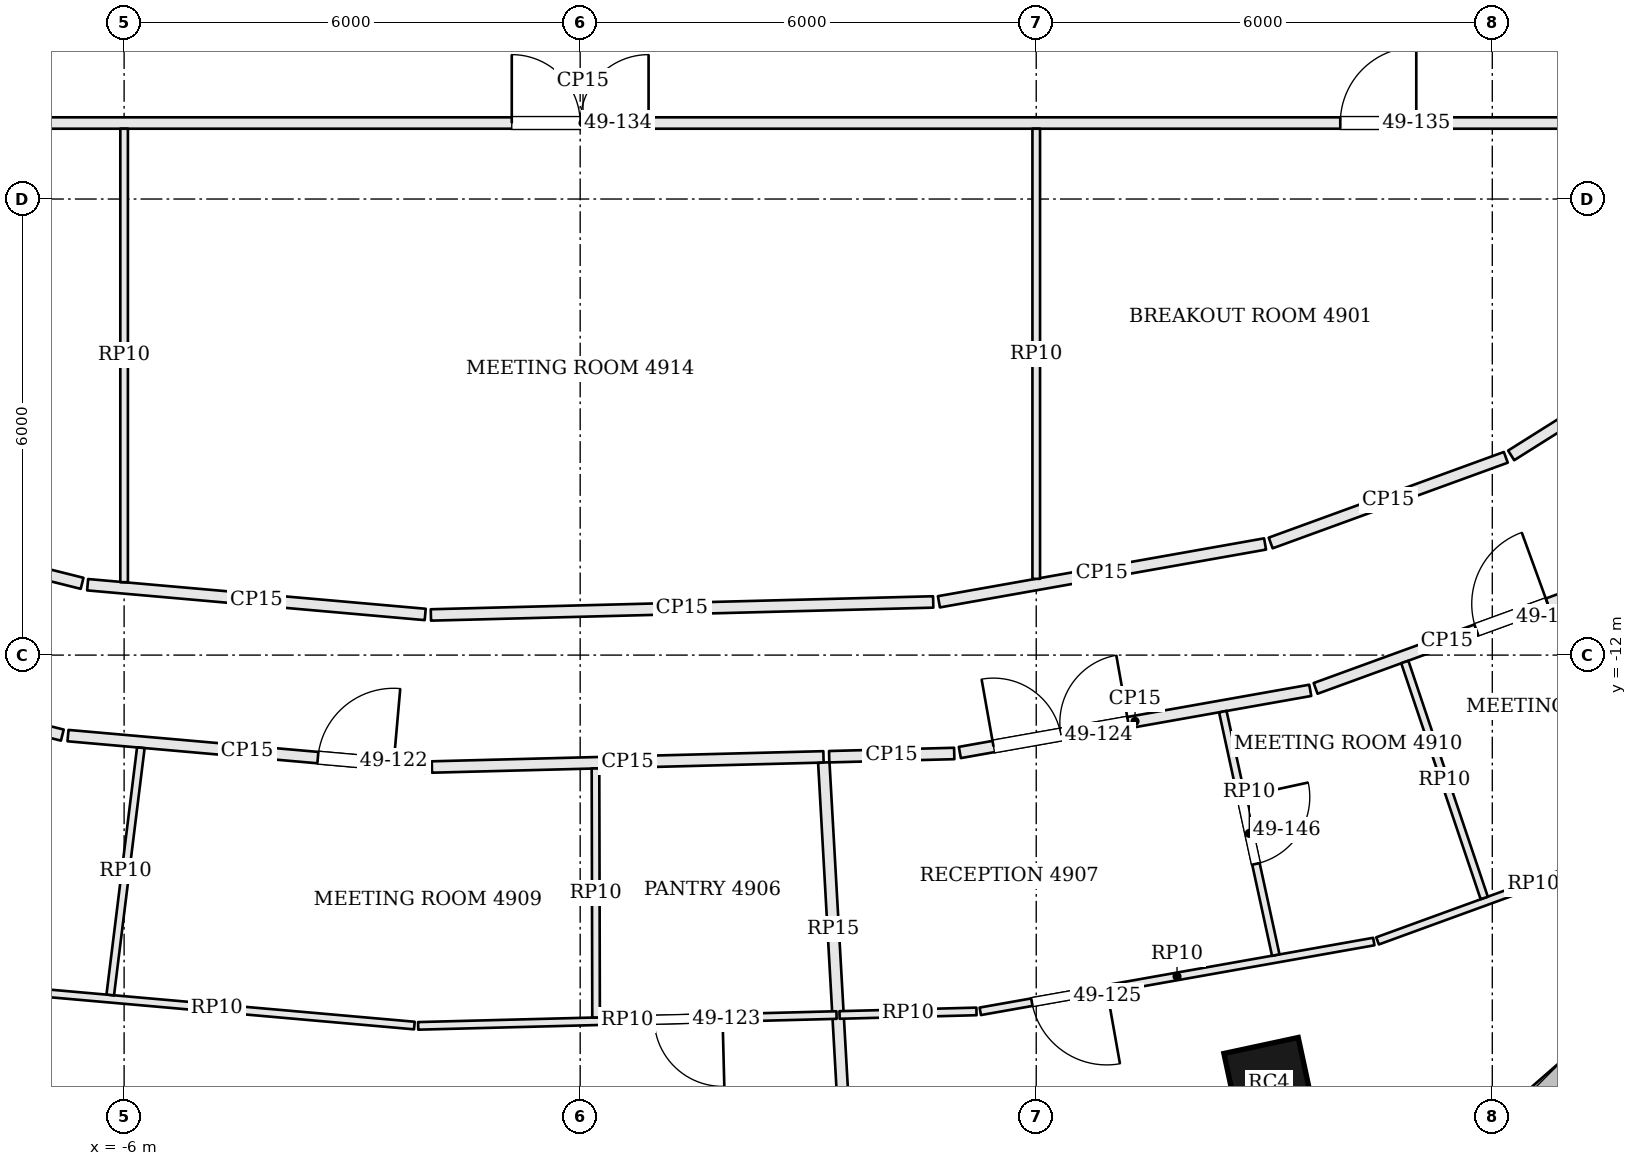
"""IFC4 building model, lengths in metres.
Left out: names, types, materials, properties, quantities, classifications, styles, units other than length and angle.
Written with IfcOpenShell. Run it as: python <this file> out.ifc"""

import sys

from ifc_helpers import new_model, si_unit, direction, frame, frame_2d, origin, origin_2d, place, context, subcontext, project, spatial, rectangle, extrude, element, fill, save


model = new_model("IFC4")
c1 = context("Model", 3, precision=1e-05, world=origin(), true_north=direction((0.0, 1.0)))
c2 = subcontext(c1, "Body", "Model", "MODEL_VIEW")
j1 = project(units=[si_unit("LENGTHUNIT", "METRE"), si_unit("PLANEANGLEUNIT", "RADIAN")], contexts=[c1])
p1 = place(None, origin())
s1 = spatial("IfcSite", under=j1, at=p1, CompositionType="ELEMENT")
p2 = place(p1, origin())
s2 = spatial("IfcBuilding", under=s1, at=p2, CompositionType="ELEMENT")
p3 = place(p2, frame((0.0, 0.0, 201.3)))
s3 = spatial("IfcBuildingStorey", under=s2, at=p3, CompositionType="ELEMENT", Elevation=201.3)
p4 = place(p3, frame((9.063, -17.625, 0.0), z_axis=(0.0, 0.0, 1.0), x_axis=(0.977652674797, 0.210226657352, 0.0)))
e1 = element("IfcColumn", 1, at=p4, inside=s3, PredefinedType="COLUMN", context=c2, shape_type="SweptSolid", body=[
    extrude(rectangle(XDim=1.0, YDim=1.0, at=origin_2d()), origin(), (0.0, 0.0, 1.0), 3.9),
])
p5 = place(p3, frame((10.146, -20.051, 0.0), z_axis=(0.0, 0.0, 1.0), x_axis=(0.753278140428, 0.657702093013, 0.0)))
e2 = element("IfcWall", 2, at=p5, inside=s3, PredefinedType="SOLIDWALL", context=c2, shape_type="SweptSolid", body=[
    extrude(rectangle(XDim=4.008, YDim=0.45, at=frame_2d((2.004, 0.0))), origin(), (0.0, 0.0, 1.0), 3.7),
])
p6 = place(p5, frame((0.954, 0.0, 0.9)))
e3 = element("IfcOpeningElement", 3, at=p6, cuts=e2, PredefinedType="OPENING", context=c2, shape_type="SweptSolid", body=[
    extrude(rectangle(XDim=2.1, YDim=2.3, at=frame_2d((1.05, 1.15))), frame((0.0, 0.235, 0.0), z_axis=(0.0, -1.0, 0.0), x_axis=(1.0, 0.0, 0.0)), (0.0, 0.0, 1.0), 0.47),
])
p7 = place(p3, frame((-11.392, -11.905, 0.0), z_axis=(0.0, 0.0, 1.0), x_axis=(0.970002383823, -0.243095403859, 0.0)))
e4 = element("IfcWall", 4, at=p7, inside=s3, PredefinedType="PARTITIONING", context=c2, shape_type="SweptSolid", body=[
    extrude(rectangle(XDim=4.72, YDim=0.15, at=frame_2d((2.36, 0.0))), origin(), (0.0, 0.0, 1.0), 3.084),
])
p8 = place(p7, frame((1.812, 0.0, 0.0)))
e5 = element("IfcOpeningElement", 5, at=p8, cuts=e4, PredefinedType="OPENING", context=c2, shape_type="SweptSolid", body=[
    extrude(rectangle(XDim=1.8, YDim=2.1, at=frame_2d((0.9, 1.05))), frame((0.0, 0.085, 0.0), z_axis=(0.0, -1.0, 0.0), x_axis=(1.0, 0.0, 0.0)), (0.0, 0.0, 1.0), 0.17),
])
p9 = place(p3, frame((-6.738, -13.059, 0.0), z_axis=(0.0, 0.0, 1.0), x_axis=(0.996143527037, -0.087738666181, 0.0)))
e6 = element("IfcWall", 6, at=p9, inside=s3, PredefinedType="PARTITIONING", context=c2, shape_type="SweptSolid", body=[
    extrude(rectangle(XDim=4.73, YDim=0.15, at=frame_2d((2.365, 0.0))), origin(), (0.0, 0.0, 1.0), 3.084),
])
p10 = place(p9, frame((3.3, 0.0, 0.0)))
e7 = element("IfcOpeningElement", 7, at=p10, cuts=e6, PredefinedType="OPENING", context=c2, shape_type="SweptSolid", body=[
    extrude(rectangle(XDim=1.0, YDim=2.4, at=frame_2d((0.5, 1.2))), frame((0.0, 0.085, 0.0), z_axis=(0.0, -1.0, 0.0), x_axis=(1.0, 0.0, 0.0)), (0.0, 0.0, 1.0), 0.17),
])
p11 = place(p3, frame((-1.951, -13.472, 0.0), z_axis=(0.0, 0.0, 1.0), x_axis=(0.999664233407, 0.025911782006, 0.0)))
e8 = element("IfcWall", 8, at=p11, inside=s3, PredefinedType="PARTITIONING", context=c2, shape_type="SweptSolid", body=[
    extrude(rectangle(XDim=5.154, YDim=0.15, at=frame_2d((2.577, 0.0))), origin(), (0.0, 0.0, 1.0), 3.084),
])
p12 = place(p3, frame((3.452, -17.796, 0.0), z_axis=(0.0, 0.0, 1.0), x_axis=(-0.056341757652, 0.998411541572, 0.0)))
e9 = element("IfcWall", 9, at=p12, inside=s3, PredefinedType="PARTITIONING", context=c2, shape_type="SweptSolid", body=[
    extrude(rectangle(XDim=4.39, YDim=0.15, at=frame_2d((2.195, 0.0))), origin(), (0.0, 0.0, 1.0), 3.084),
])
p13 = place(p3, frame((3.276, -13.337, 0.0), z_axis=(0.0, 0.0, 1.0), x_axis=(0.999662995572, 0.025959493133, 0.0)))
e10 = element("IfcWall", 10, at=p13, inside=s3, PredefinedType="PARTITIONING", context=c2, shape_type="SweptSolid", body=[
    extrude(rectangle(XDim=1.646, YDim=0.15, at=frame_2d((0.823, 0.0))), origin(), (0.0, 0.0, 1.0), 3.084),
])
p14 = place(p3, frame((4.995, -13.281, 0.0), z_axis=(0.0, 0.0, 1.0), x_axis=(0.98463411377, 0.174630071865, 0.0)))
e11 = element("IfcWall", 11, at=p14, inside=s3, PredefinedType="PARTITIONING", context=c2, shape_type="SweptSolid", body=[
    extrude(rectangle(XDim=4.682, YDim=0.15, at=frame_2d((2.341, 0.0))), origin(), (0.0, 0.0, 1.0), 3.084),
])
p15 = place(p14, frame((0.45, 0.0, 0.0)))
e12 = element("IfcOpeningElement", 12, at=p15, cuts=e11, PredefinedType="OPENING", context=c2, shape_type="SweptSolid", body=[
    extrude(rectangle(XDim=1.8, YDim=2.1, at=frame_2d((0.9, 1.05))), frame((0.0, 0.085, 0.0), z_axis=(0.0, -1.0, 0.0), x_axis=(1.0, 0.0, 0.0)), (0.0, 0.0, 1.0), 0.17),
])
p16 = place(p3, frame((9.676, -12.438, 0.0), z_axis=(0.0, 0.0, 1.0), x_axis=(0.939640289748, 0.342163887461, 0.0)))
e13 = element("IfcWall", 13, at=p16, inside=s3, PredefinedType="PARTITIONING", context=c2, shape_type="SweptSolid", body=[
    extrude(rectangle(XDim=3.68, YDim=0.15, at=frame_2d((1.84, 0.0))), origin(), (0.0, 0.0, 1.0), 3.084),
])
p17 = place(p16, frame((2.25, 0.0, 0.0)))
e14 = element("IfcOpeningElement", 14, at=p17, cuts=e13, PredefinedType="OPENING", context=c2, shape_type="SweptSolid", body=[
    extrude(rectangle(XDim=1.0, YDim=2.4, at=frame_2d((0.5, 1.2))), frame((0.0, 0.085, 0.0), z_axis=(0.0, -1.0, 0.0), x_axis=(1.0, 0.0, 0.0)), (0.0, 0.0, 1.0), 0.17),
])
p18 = place(p3, frame((14.777, -7.781, 0.0), z_axis=(0.0, 0.0, 1.0), x_axis=(-0.846359741043, -0.532611667862, 0.0)))
e15 = element("IfcWall", 15, at=p18, inside=s3, PredefinedType="PARTITIONING", context=c2, shape_type="SweptSolid", body=[
    extrude(rectangle(XDim=2.987, YDim=0.15, at=frame_2d((1.494, 0.0))), origin(), (0.0, 0.0, 1.0), 3.084),
])
p19 = place(p3, frame((12.178, -9.398, 0.0), z_axis=(0.0, 0.0, 1.0), x_axis=(-0.939609240084, -0.342249143093, 0.0)))
e16 = element("IfcWall", 16, at=p19, inside=s3, PredefinedType="PARTITIONING", context=c2, shape_type="SweptSolid", body=[
    extrude(rectangle(XDim=3.292, YDim=0.15, at=frame_2d((1.646, 0.0))), origin(), (0.0, 0.0, 1.0), 3.084),
])
p20 = place(p3, frame((9.01, -10.538, 0.0), z_axis=(0.0, 0.0, 1.0), x_axis=(-0.984645638575, -0.174565077936, 0.0)))
e17 = element("IfcWall", 17, at=p20, inside=s3, PredefinedType="PARTITIONING", context=c2, shape_type="SweptSolid", body=[
    extrude(rectangle(XDim=4.358, YDim=0.15, at=frame_2d((2.179, 0.0))), origin(), (0.0, 0.0, 1.0), 3.084),
])
p21 = place(p3, frame((4.645, -11.301, 0.0), z_axis=(0.0, 0.0, 1.0), x_axis=(-0.9996648469, -0.02588810291, 0.0)))
e18 = element("IfcWall", 18, at=p21, inside=s3, PredefinedType="PARTITIONING", context=c2, shape_type="SweptSolid", body=[
    extrude(rectangle(XDim=6.611, YDim=0.15, at=frame_2d((3.305, 0.0))), origin(), (0.0, 0.0, 1.0), 3.084),
])
p22 = place(p3, frame((-2.039, -11.465, 0.0), z_axis=(0.0, 0.0, 1.0), x_axis=(-0.996139855484, 0.087780341286, 0.0)))
e19 = element("IfcWall", 19, at=p22, inside=s3, PredefinedType="PARTITIONING", context=c2, shape_type="SweptSolid", body=[
    extrude(rectangle(XDim=4.458, YDim=0.15, at=frame_2d((2.229, 0.0))), origin(), (0.0, 0.0, 1.0), 3.084),
])
p23 = place(p3, frame((-6.553, -11.056, 0.0), z_axis=(0.0, 0.0, 1.0), x_axis=(-0.970004917182, 0.243085294995, 0.0)))
e20 = element("IfcWall", 20, at=p23, inside=s3, PredefinedType="PARTITIONING", context=c2, shape_type="SweptSolid", body=[
    extrude(rectangle(XDim=4.284, YDim=0.15, at=frame_2d((2.142, 0.0))), origin(), (0.0, 0.0, 1.0), 3.084),
])
p24 = place(p3, frame((-14.925, -5.0, 0.0), z_axis=(0.0, 0.0, 1.0), x_axis=(1.0, 0.0, 0.0)))
e21 = element("IfcWall", 21, at=p24, inside=s3, PredefinedType="PARTITIONING", context=c2, shape_type="SweptSolid", body=[
    extrude(rectangle(XDim=29.925, YDim=0.15, at=frame_2d((14.962, 0.0))), origin(), (0.0, 0.0, 1.0), 3.084),
])
p25 = place(p24, frame((3.925, 0.0, 0.0)))
e22 = element("IfcOpeningElement", 22, at=p25, cuts=e21, PredefinedType="OPENING", context=c2, shape_type="SweptSolid", body=[
    extrude(rectangle(XDim=1.0, YDim=2.1, at=frame_2d((0.5, 1.05))), frame((0.0, 0.085, 0.0), z_axis=(0.0, -1.0, 0.0), x_axis=(1.0, 0.0, 0.0)), (0.0, 0.0, 1.0), 0.17),
])
p26 = place(p24, frame((14.025, 0.0, 0.0)))
e23 = element("IfcOpeningElement", 23, at=p26, cuts=e21, PredefinedType="OPENING", context=c2, shape_type="SweptSolid", body=[
    extrude(rectangle(XDim=1.8, YDim=2.1, at=frame_2d((0.9, 1.05))), frame((0.0, 0.085, 0.0), z_axis=(0.0, -1.0, 0.0), x_axis=(1.0, 0.0, 0.0)), (0.0, 0.0, 1.0), 0.17),
])
p27 = place(p24, frame((24.925, 0.0, 0.0)))
e24 = element("IfcOpeningElement", 24, at=p27, cuts=e21, PredefinedType="OPENING", context=c2, shape_type="SweptSolid", body=[
    extrude(rectangle(XDim=1.0, YDim=2.1, at=frame_2d((0.5, 1.05))), frame((0.0, 0.085, 0.0), z_axis=(0.0, -1.0, 0.0), x_axis=(1.0, 0.0, 0.0)), (0.0, 0.0, 1.0), 0.17),
])
p28 = place(p3, frame((3.373, -16.736, 0.0), z_axis=(0.0, 0.0, 1.0), x_axis=(-0.99966581351, -0.025850750467, 0.0)))
e25 = element("IfcWall", 25, at=p28, inside=s3, PredefinedType="PARTITIONING", context=c2, shape_type="SweptSolid", body=[
    extrude(rectangle(XDim=5.506, YDim=0.1, at=frame_2d((2.753, 0.0))), origin(), (0.0, 0.0, 1.0), 3.084),
])
p29 = place(p28, frame((1.5, 0.0, 0.0)))
e26 = element("IfcOpeningElement", 26, at=p29, cuts=e25, PredefinedType="OPENING", context=c2, shape_type="SweptSolid", body=[
    extrude(rectangle(XDim=0.9, YDim=2.1, at=frame_2d((0.45, 1.05))), frame((0.0, 0.06, 0.0), z_axis=(0.0, -1.0, 0.0), x_axis=(1.0, 0.0, 0.0)), (0.0, 0.0, 1.0), 0.12),
])
p30 = place(p3, frame((-2.181, -16.874, 0.0), z_axis=(0.0, 0.0, 1.0), x_axis=(-0.996143934904, 0.087734035321, 0.0)))
e27 = element("IfcWall", 27, at=p30, inside=s3, PredefinedType="PARTITIONING", context=c2, shape_type="SweptSolid", body=[
    extrude(rectangle(XDim=5.218, YDim=0.1, at=frame_2d((2.609, 0.0))), origin(), (0.0, 0.0, 1.0), 3.084),
])
p31 = place(p3, frame((-5.78, -13.219, 0.0), z_axis=(0.0, 0.0, 1.0), x_axis=(-0.122778425758, -0.992434107721, 0.0)))
e28 = element("IfcWall", 28, at=p31, inside=s3, PredefinedType="PARTITIONING", context=c2, shape_type="SweptSolid", body=[
    extrude(rectangle(XDim=3.277, YDim=0.1, at=frame_2d((1.639, 0.0))), origin(), (0.0, 0.0, 1.0), 3.084),
])
p32 = place(p3, frame((0.201, -13.491, 0.0), z_axis=(0.0, 0.0, 1.0), x_axis=(0.002384849381, -0.999997156243, 0.0)))
e29 = element("IfcWall", 29, at=p32, inside=s3, PredefinedType="PARTITIONING", context=c2, shape_type="SweptSolid", body=[
    extrude(rectangle(XDim=3.276, YDim=0.1, at=frame_2d((1.638, 0.0))), origin(), (0.0, 0.0, 1.0), 3.084),
])
p33 = place(p3, frame((14.59, -14.267, 0.0), z_axis=(0.0, 0.0, 1.0), x_axis=(-0.939623405418, -0.342210251148, 0.0)))
e30 = element("IfcWall", 30, at=p33, inside=s3, PredefinedType="PARTITIONING", context=c2, shape_type="SweptSolid", body=[
    extrude(rectangle(XDim=4.363, YDim=0.1, at=frame_2d((2.182, 0.0))), origin(), (0.0, 0.0, 1.0), 3.084),
])
p34 = place(p3, frame((10.441, -15.769, 0.0), z_axis=(0.0, 0.0, 1.0), x_axis=(-0.984642067447, -0.174585219919, 0.0)))
e31 = element("IfcWall", 31, at=p34, inside=s3, PredefinedType="PARTITIONING", context=c2, shape_type="SweptSolid", body=[
    extrude(rectangle(XDim=5.258, YDim=0.1, at=frame_2d((2.629, 0.0))), origin(), (0.0, 0.0, 1.0), 3.084),
])
p35 = place(p34, frame((3.569, 0.0, 0.0)))
e32 = element("IfcOpeningElement", 32, at=p35, cuts=e31, PredefinedType="OPENING", context=c2, shape_type="SweptSolid", body=[
    extrude(rectangle(XDim=1.0, YDim=2.1, at=frame_2d((0.5, 1.05))), frame((0.0, 0.06, 0.0), z_axis=(0.0, -1.0, 0.0), x_axis=(1.0, 0.0, 0.0)), (0.0, 0.0, 1.0), 0.12),
])
p36 = place(p3, frame((5.214, -16.688, 0.0), z_axis=(0.0, 0.0, 1.0), x_axis=(-0.999661565486, -0.026014505364, 0.0)))
e33 = element("IfcWall", 33, at=p36, inside=s3, PredefinedType="PARTITIONING", context=c2, shape_type="SweptSolid", body=[
    extrude(rectangle(XDim=1.802, YDim=0.1, at=frame_2d((0.901, 0.0))), origin(), (0.0, 0.0, 1.0), 3.084),
])
p37 = place(p3, frame((8.455, -12.744, 0.0), z_axis=(0.0, 0.0, 1.0), x_axis=(0.212519326974, -0.977156863386, 0.0)))
e34 = element("IfcWall", 34, at=p37, inside=s3, PredefinedType="PARTITIONING", context=c2, shape_type="SweptSolid", body=[
    extrude(rectangle(XDim=3.278, YDim=0.1, at=frame_2d((1.639, 0.0))), origin(), (0.0, 0.0, 1.0), 3.084),
])
p38 = place(p37, frame((1.15, 0.0, 0.0)))
e35 = element("IfcOpeningElement", 35, at=p38, cuts=e34, PredefinedType="OPENING", context=c2, shape_type="SweptSolid", body=[
    extrude(rectangle(XDim=0.9, YDim=2.1, at=frame_2d((0.45, 1.05))), frame((0.0, 0.06, 0.0), z_axis=(0.0, -1.0, 0.0), x_axis=(1.0, 0.0, 0.0)), (0.0, 0.0, 1.0), 0.12),
])
p39 = place(p3, frame((10.849, -12.091, 0.0), z_axis=(0.0, 0.0, 1.0), x_axis=(0.319043433682, -0.94774009487, 0.0)))
e36 = element("IfcWall", 36, at=p39, inside=s3, PredefinedType="PARTITIONING", context=c2, shape_type="SweptSolid", body=[
    extrude(rectangle(XDim=3.276, YDim=0.1, at=frame_2d((1.638, 0.0))), origin(), (0.0, 0.0, 1.0), 3.084),
])
p40 = place(p3, frame((-6.0, -11.041, 0.0), z_axis=(0.0, 0.0, 1.0), x_axis=(0.0, 1.0, 0.0)))
e37 = element("IfcWall", 37, at=p40, inside=s3, PredefinedType="PARTITIONING", context=c2, shape_type="SweptSolid", body=[
    extrude(rectangle(XDim=5.966, YDim=0.1, at=frame_2d((2.983, 0.0))), origin(), (0.0, 0.0, 1.0), 3.084),
])
p41 = place(p3, frame((6.0, -10.997, 0.0), z_axis=(0.0, 0.0, 1.0), x_axis=(0.0, 1.0, 0.0)))
e38 = element("IfcWall", 38, at=p41, inside=s3, PredefinedType="PARTITIONING", context=c2, shape_type="SweptSolid", body=[
    extrude(rectangle(XDim=5.922, YDim=0.1, at=frame_2d((2.961, 0.0))), origin(), (0.0, 0.0, 1.0), 3.084),
])
p42 = place(p10, origin())
e39 = element("IfcDoor", 39, at=p42, inside=s3, OperationType="SINGLE_SWING_RIGHT", PredefinedType="DOOR", context=c2, shape_type="SweptSolid", body=[
    extrude(rectangle(XDim=1.0, YDim=2.4, at=frame_2d((0.5, 1.2))), frame((0.0, 0.025, 0.0), z_axis=(0.0, -1.0, 0.0), x_axis=(1.0, 0.0, 0.0)), (0.0, 0.0, 1.0), 0.05),
])
fill(e7, e39)
p43 = place(p29, origin())
e40 = element("IfcDoor", 40, at=p43, inside=s3, OperationType="SINGLE_SWING_LEFT", PredefinedType="DOOR", context=c2, shape_type="SweptSolid", body=[
    extrude(rectangle(XDim=0.9, YDim=2.1, at=frame_2d((0.45, 1.05))), frame((0.0, 0.025, 0.0), z_axis=(0.0, -1.0, 0.0), x_axis=(1.0, 0.0, 0.0)), (0.0, 0.0, 1.0), 0.05),
])
fill(e26, e40)
p44 = place(p15, origin())
e41 = element("IfcDoor", 41, at=p44, inside=s3, OperationType="DOUBLE_DOOR_SINGLE_SWING", PredefinedType="DOOR", context=c2, shape_type="SweptSolid", body=[
    extrude(rectangle(XDim=1.8, YDim=2.1, at=frame_2d((0.9, 1.05))), frame((0.0, 0.025, 0.0), z_axis=(0.0, -1.0, 0.0), x_axis=(1.0, 0.0, 0.0)), (0.0, 0.0, 1.0), 0.05),
])
fill(e12, e41)
p45 = place(p35, origin())
e42 = element("IfcDoor", 42, at=p45, inside=s3, OperationType="SINGLE_SWING_LEFT", PredefinedType="DOOR", context=c2, shape_type="SweptSolid", body=[
    extrude(rectangle(XDim=1.0, YDim=2.1, at=frame_2d((0.5, 1.05))), frame((0.0, 0.025, 0.0), z_axis=(0.0, -1.0, 0.0), x_axis=(1.0, 0.0, 0.0)), (0.0, 0.0, 1.0), 0.05),
])
fill(e32, e42)
p46 = place(p17, origin())
e43 = element("IfcDoor", 43, at=p46, inside=s3, OperationType="SINGLE_SWING_RIGHT", PredefinedType="DOOR", context=c2, shape_type="SweptSolid", body=[
    extrude(rectangle(XDim=1.0, YDim=2.4, at=frame_2d((0.5, 1.2))), frame((0.0, 0.025, 0.0), z_axis=(0.0, -1.0, 0.0), x_axis=(1.0, 0.0, 0.0)), (0.0, 0.0, 1.0), 0.05),
])
fill(e14, e43)
p47 = place(p26, origin())
e44 = element("IfcDoor", 44, at=p47, inside=s3, OperationType="DOUBLE_DOOR_SINGLE_SWING", PredefinedType="DOOR", context=c2, shape_type="SweptSolid", body=[
    extrude(rectangle(XDim=1.8, YDim=2.1, at=frame_2d((0.9, 1.05))), frame((0.0, 0.025, 0.0), z_axis=(0.0, -1.0, 0.0), x_axis=(1.0, 0.0, 0.0)), (0.0, 0.0, 1.0), 0.05),
])
fill(e23, e44)
p48 = place(p27, origin())
e45 = element("IfcDoor", 45, at=p48, inside=s3, OperationType="SINGLE_SWING_RIGHT", PredefinedType="DOOR", context=c2, shape_type="SweptSolid", body=[
    extrude(rectangle(XDim=1.0, YDim=2.1, at=frame_2d((0.5, 1.05))), frame((0.0, 0.025, 0.0), z_axis=(0.0, -1.0, 0.0), x_axis=(1.0, 0.0, 0.0)), (0.0, 0.0, 1.0), 0.05),
])
fill(e24, e45)
p49 = place(p38, origin())
e46 = element("IfcDoor", 46, at=p49, inside=s3, OperationType="SINGLE_SWING_LEFT", PredefinedType="DOOR", context=c2, shape_type="SweptSolid", body=[
    extrude(rectangle(XDim=0.9, YDim=2.1, at=frame_2d((0.45, 1.05))), frame((0.0, 0.025, 0.0), z_axis=(0.0, -1.0, 0.0), x_axis=(1.0, 0.0, 0.0)), (0.0, 0.0, 1.0), 0.05),
])
fill(e35, e46)
save(model, sys.argv[1])
